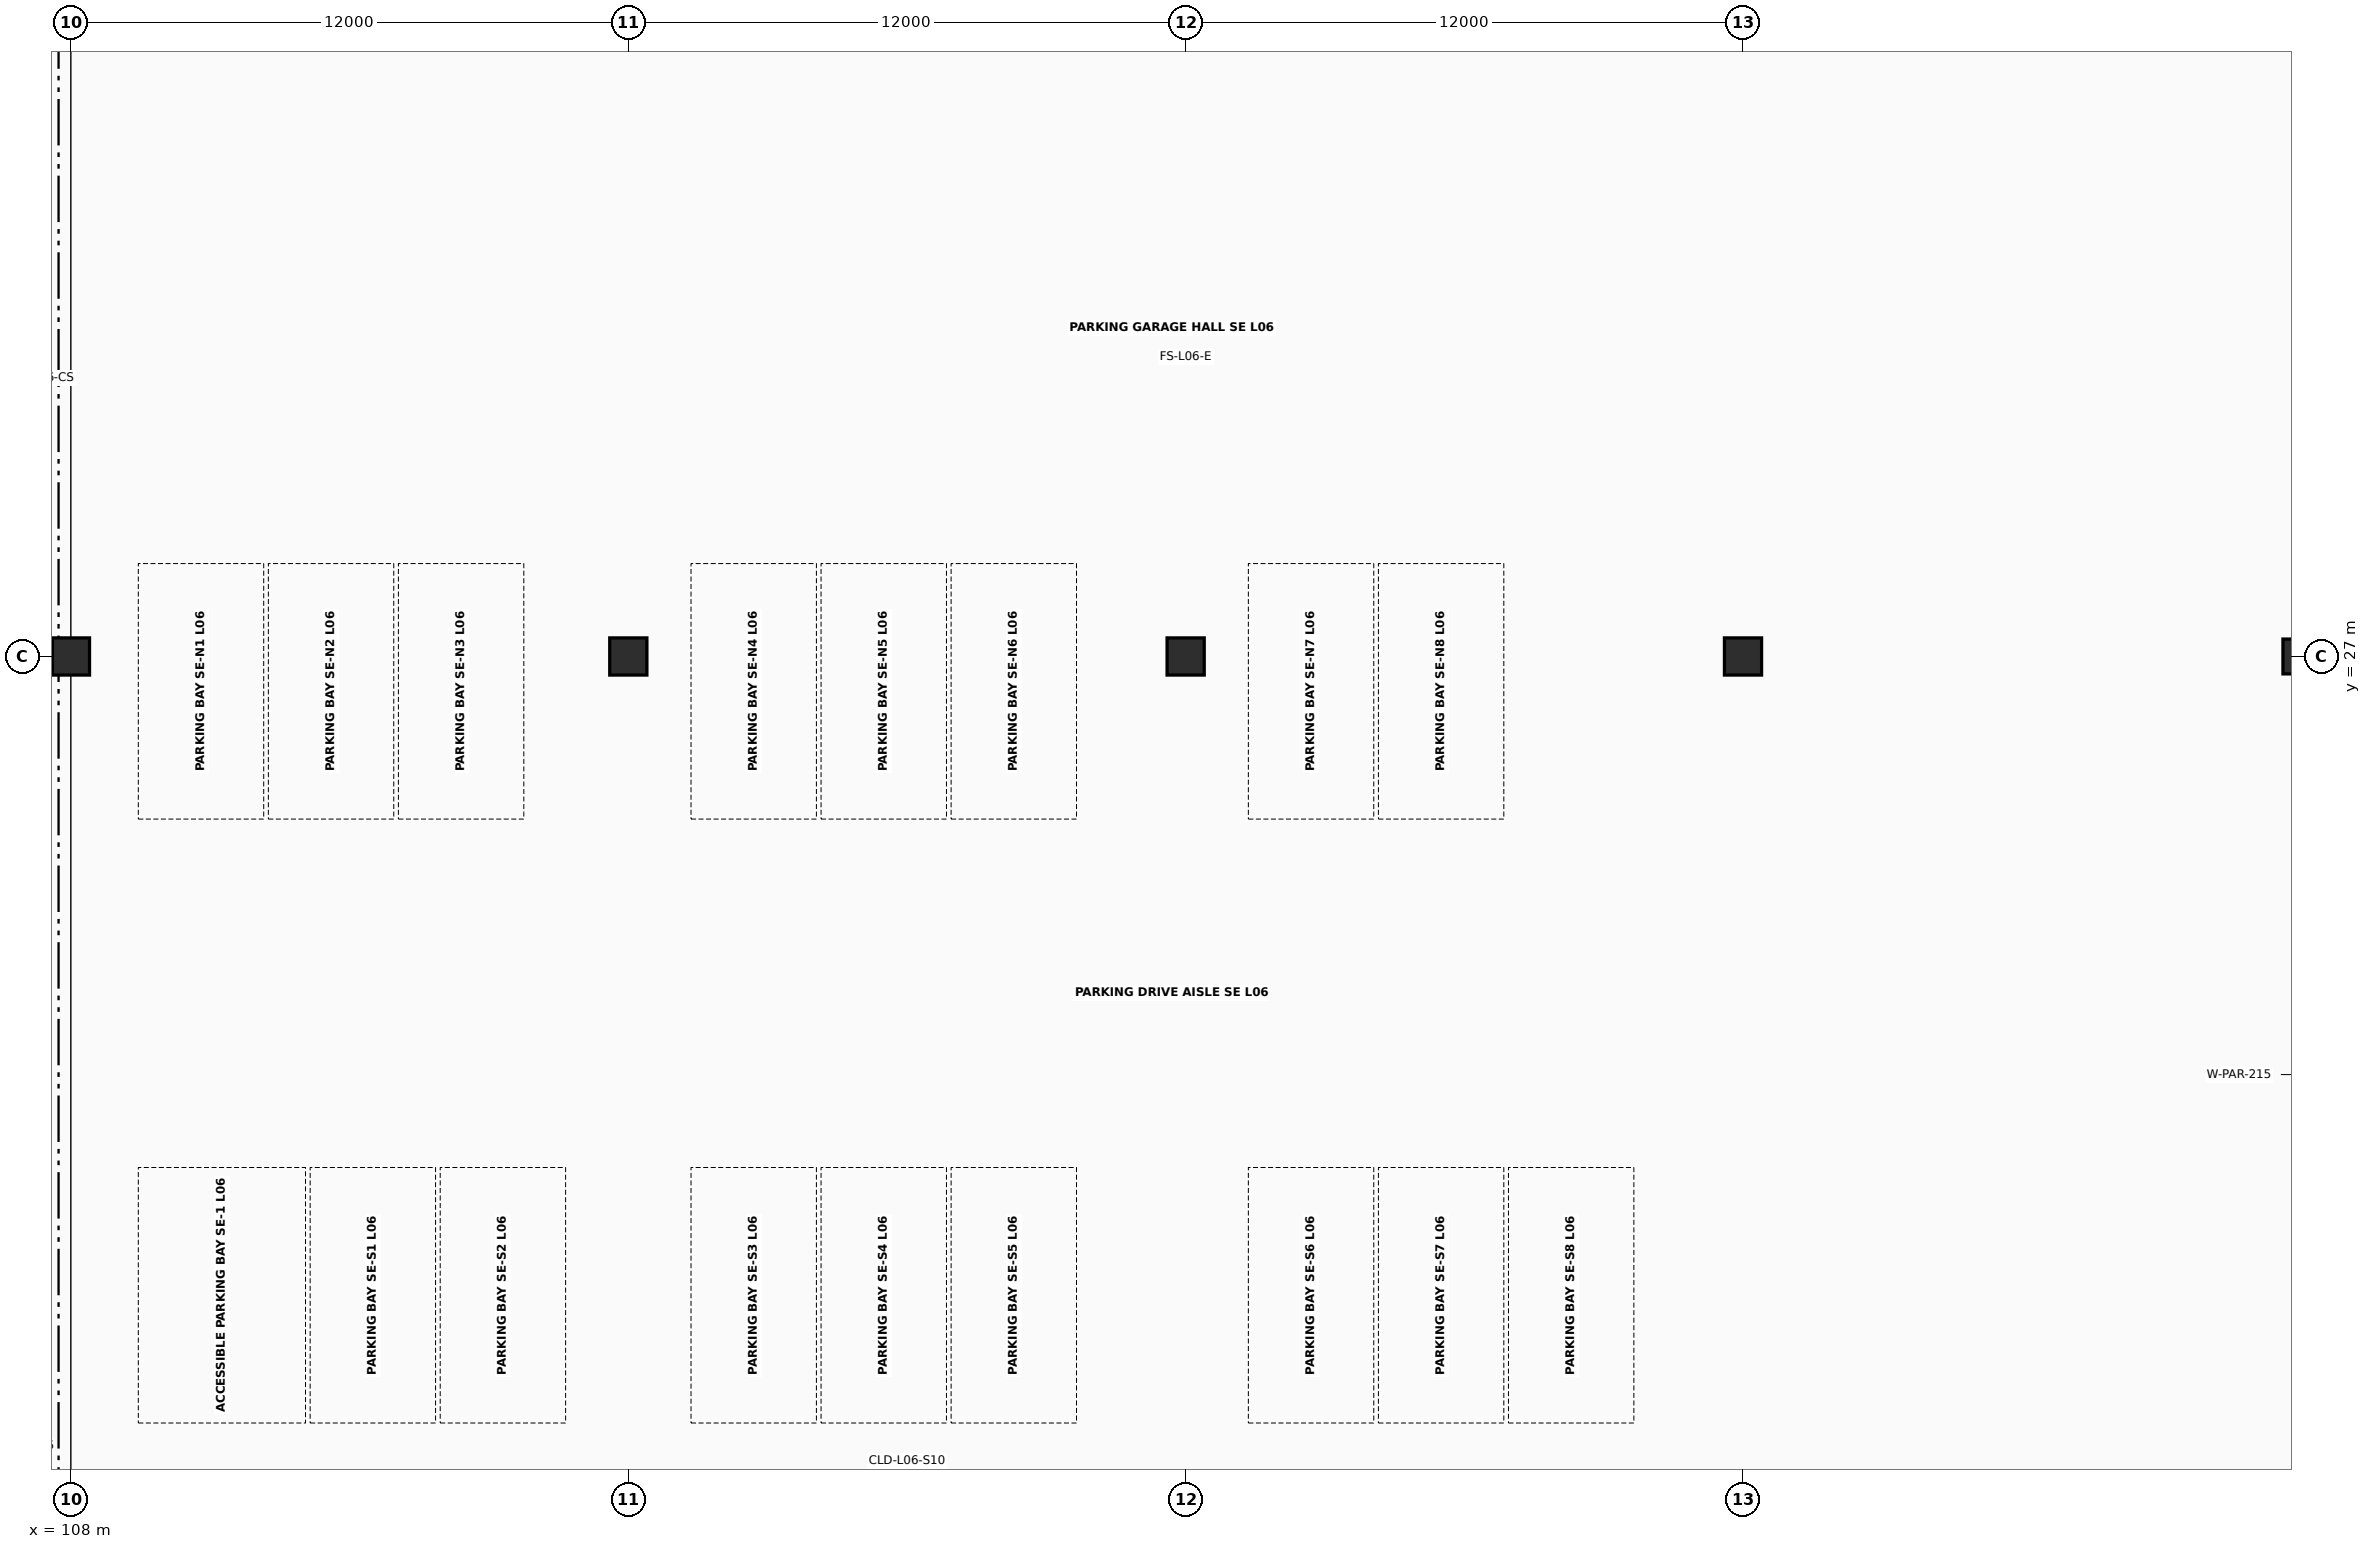
"""IFC4 building model, lengths in metres.
Left out: names, types, materials, properties, quantities, classifications, styles, units other than length and angle.
Written with IfcOpenShell. Run it as: python <this file> out.ifc"""

import sys

from ifc_helpers import new_model, si_unit, direction, frame, origin, origin_2d, place, context, subcontext, project, spatial, rectangle, extrude, element, save


model = new_model("IFC4")
c1 = context("Model", 3, precision=1e-05, world=origin(), true_north=direction((0.0, 1.0)))
c2 = subcontext(c1, "Body", "Model", "MODEL_VIEW")
j1 = project(units=[si_unit("LENGTHUNIT", "METRE"), si_unit("PLANEANGLEUNIT", "RADIAN")], contexts=[c1])
p1 = place(None, origin())
s1 = spatial("IfcSite", under=j1, at=p1, CompositionType="ELEMENT")
p2 = place(p1, origin())
s2 = spatial("IfcBuilding", under=s1, at=p2, CompositionType="ELEMENT")
p3 = place(p2, frame((0.0, 0.0, 24.8)))
s3 = spatial("IfcBuildingStorey", under=s2, at=p3, CompositionType="ELEMENT", Elevation=24.8)
for number, where, z_axis, x_axis in (
    (1, (108.0, 27.0, 0.0), (0.0, 0.0, 1.0), (1.0, 0.0, 0.0)),
    (2, (120.0, 27.0, 0.0), (0.0, 0.0, 1.0), (1.0, 0.0, 0.0)),
    (3, (132.0, 27.0, 0.0), (0.0, 0.0, 1.0), (1.0, 0.0, 0.0)),
    (4, (144.0, 27.0, 0.0), (0.0, 0.0, 1.0), (1.0, 0.0, 0.0)),
):
    element("IfcColumn", number, at=place(p3, frame(where, z_axis=z_axis, x_axis=x_axis)), inside=s3, PredefinedType="COLUMN", context=c2, shape_type="SweptSolid", body=[
        extrude(rectangle(XDim=0.8, YDim=0.8, at=origin_2d()), origin(), (0.0, 0.0, 1.0), 3.8),
    ])
p4 = place(p3, frame((156.0, 27.0, 0.0), z_axis=(0.0, 0.0, 1.0), x_axis=(1.0, 0.0, 0.0)))
e5 = element("IfcColumn", 5, at=p4, inside=s3, PredefinedType="COLUMN", context=c2, shape_type="SweptSolid", body=[
    extrude(rectangle(XDim=0.75, YDim=0.75, at=origin_2d()), origin(), (0.0, 0.0, 1.0), 3.8),
])
save(model, sys.argv[1])
